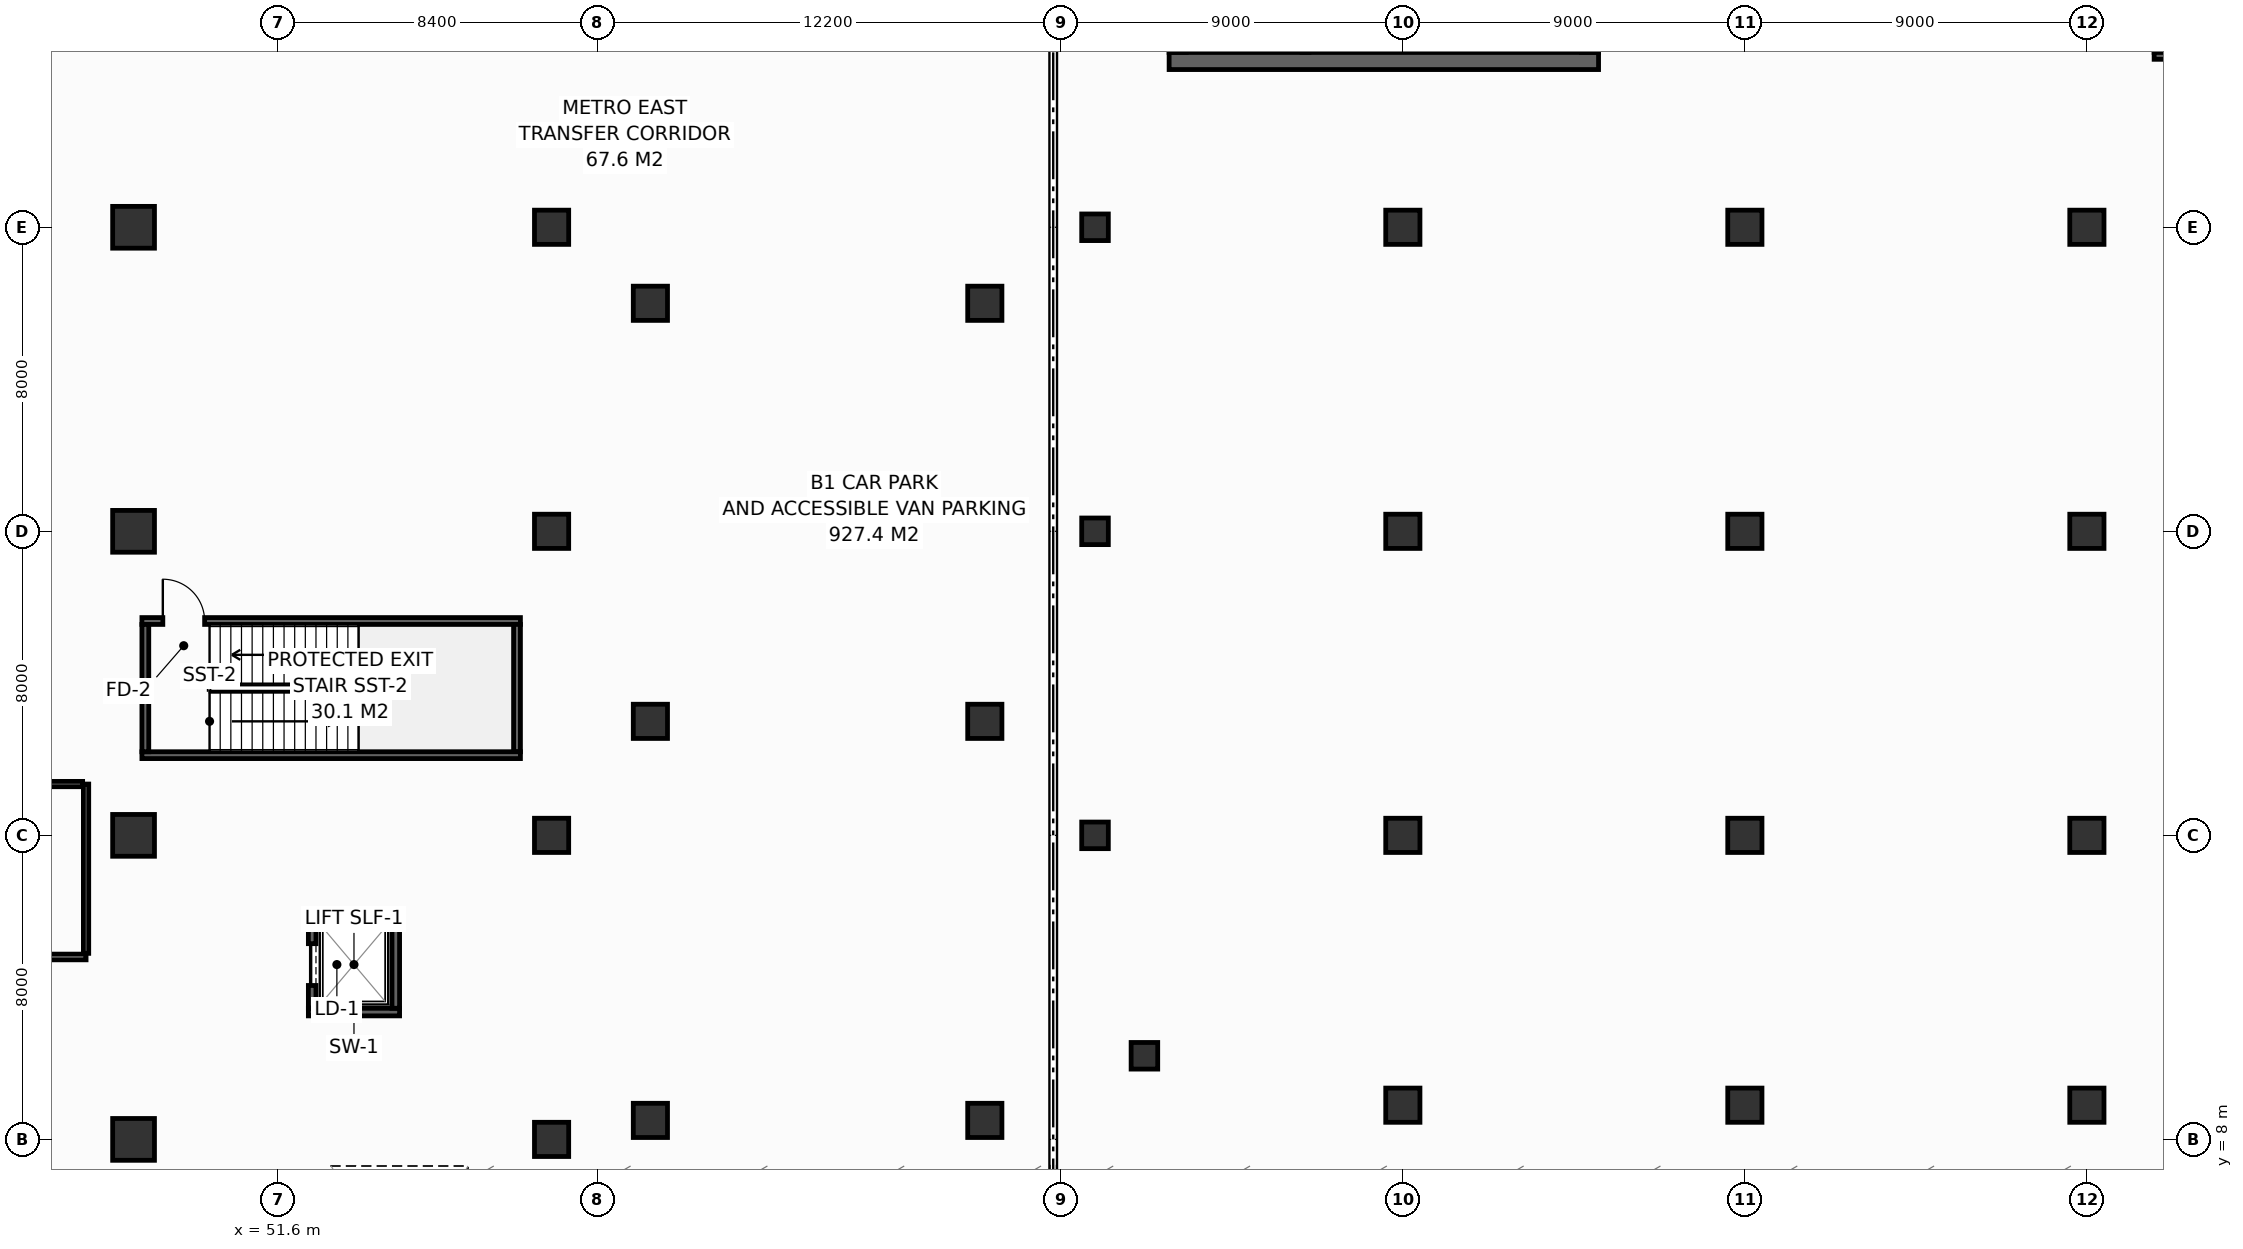
"""IFC4 building model, lengths in metres.
Left out: names, types, materials, properties, quantities, classifications, styles, units other than length and angle.
Written with IfcOpenShell. Run it as: python <this file> out.ifc"""

import sys

from ifc_helpers import new_model, si_unit, direction, frame, frame_2d, origin, origin_2d, place, context, subcontext, project, spatial, rectangle, extrude, element, fill, save


model = new_model("IFC4")
c1 = context("Model", 3, precision=1e-05, world=origin(), true_north=direction((0.0, 1.0)))
c2 = subcontext(c1, "Body", "Model", "MODEL_VIEW")
j1 = project(units=[si_unit("LENGTHUNIT", "METRE"), si_unit("PLANEANGLEUNIT", "RADIAN")], contexts=[c1])
p1 = place(None, origin())
s1 = spatial("IfcSite", under=j1, at=p1, CompositionType="ELEMENT")
p2 = place(p1, origin())
s2 = spatial("IfcBuilding", under=s1, at=p2, CompositionType="ELEMENT")
p3 = place(p2, frame((0.0, 0.0, -5.4)))
s3 = spatial("IfcBuildingStorey", under=s2, at=p3, CompositionType="ELEMENT", Elevation=-5.4)
p4 = place(p3, frame((75.05, 36.375, 0.0), z_axis=(0.0, 0.0, 1.0), x_axis=(1.0, 0.0, 0.0)))
e1 = element("IfcWall", 1, at=p4, inside=s3, PredefinedType="SHEAR", context=c2, shape_type="SweptSolid", body=[
    extrude(rectangle(XDim=11.3, YDim=0.45, at=frame_2d((5.65, 0.0))), origin(), (0.0, 0.0, 1.0), 5.05),
])
for number, where, z_axis, x_axis in (
    (2, (47.8, 8.0, 0.0), (0.0, 0.0, 1.0), (1.0, 0.0, 0.0)),
    (3, (47.8, 16.0, 0.0), (0.0, 0.0, 1.0), (1.0, 0.0, 0.0)),
    (4, (47.8, 24.0, 0.0), (0.0, 0.0, 1.0), (1.0, 0.0, 0.0)),
    (5, (47.8, 32.0, 0.0), (0.0, 0.0, 1.0), (1.0, 0.0, 0.0)),
):
    element("IfcColumn", number, at=place(p3, frame(where, z_axis=z_axis, x_axis=x_axis)), inside=s3, PredefinedType="COLUMN", context=c2, shape_type="SweptSolid", body=[
        extrude(rectangle(XDim=1.1, YDim=1.1, at=origin_2d()), origin(), (0.0, 0.0, 1.0), 5.4),
    ])
for number, where, z_axis, x_axis in (
    (6, (58.8, 8.0, 0.0), (0.0, 0.0, 1.0), (1.0, 0.0, 0.0)),
    (7, (58.8, 16.0, 0.0), (0.0, 0.0, 1.0), (1.0, 0.0, 0.0)),
    (8, (58.8, 24.0, 0.0), (0.0, 0.0, 1.0), (1.0, 0.0, 0.0)),
    (9, (58.8, 32.0, 0.0), (0.0, 0.0, 1.0), (1.0, 0.0, 0.0)),
    (10, (61.4, 8.5, 0.0), (0.0, 0.0, 1.0), (1.0, 0.0, 0.0)),
    (11, (70.2, 8.5, 0.0), (0.0, 0.0, 1.0), (1.0, 0.0, 0.0)),
    (12, (61.4, 19.0, 0.0), (0.0, 0.0, 1.0), (1.0, 0.0, 0.0)),
    (13, (70.2, 19.0, 0.0), (0.0, 0.0, 1.0), (1.0, 0.0, 0.0)),
    (14, (61.4, 30.0, 0.0), (0.0, 0.0, 1.0), (1.0, 0.0, 0.0)),
    (15, (70.2, 30.0, 0.0), (0.0, 0.0, 1.0), (1.0, 0.0, 0.0)),
):
    element("IfcColumn", number, at=place(p3, frame(where, z_axis=z_axis, x_axis=x_axis)), inside=s3, PredefinedType="COLUMN", context=c2, shape_type="SweptSolid", body=[
        extrude(rectangle(XDim=0.9, YDim=0.9, at=origin_2d()), origin(), (0.0, 0.0, 1.0), 5.4),
    ])
for number, where, z_axis, x_axis in (
    (16, (74.4, 10.2, 0.0), (0.0, 0.0, 1.0), (1.0, 0.0, 0.0)),
    (17, (73.1, 16.0, 0.0), (0.0, 0.0, 1.0), (1.0, 0.0, 0.0)),
    (18, (73.1, 24.0, 0.0), (0.0, 0.0, 1.0), (1.0, 0.0, 0.0)),
    (19, (73.1, 32.0, 0.0), (0.0, 0.0, 1.0), (1.0, 0.0, 0.0)),
):
    element("IfcColumn", number, at=place(p3, frame(where, z_axis=z_axis, x_axis=x_axis)), inside=s3, PredefinedType="COLUMN", context=c2, shape_type="SweptSolid", body=[
        extrude(rectangle(XDim=0.7, YDim=0.7, at=origin_2d()), origin(), (0.0, 0.0, 1.0), 5.4),
    ])
for number, where, z_axis, x_axis in (
    (20, (81.2, 8.9, 0.0), (0.0, 0.0, 1.0), (1.0, 0.0, 0.0)),
    (21, (81.2, 16.0, 0.0), (0.0, 0.0, 1.0), (1.0, 0.0, 0.0)),
    (22, (81.2, 24.0, 0.0), (0.0, 0.0, 1.0), (1.0, 0.0, 0.0)),
    (23, (81.2, 32.0, 0.0), (0.0, 0.0, 1.0), (1.0, 0.0, 0.0)),
    (24, (90.2, 8.9, 0.0), (0.0, 0.0, 1.0), (1.0, 0.0, 0.0)),
    (25, (90.2, 16.0, 0.0), (0.0, 0.0, 1.0), (1.0, 0.0, 0.0)),
    (26, (90.2, 24.0, 0.0), (0.0, 0.0, 1.0), (1.0, 0.0, 0.0)),
    (27, (90.2, 32.0, 0.0), (0.0, 0.0, 1.0), (1.0, 0.0, 0.0)),
    (28, (99.2, 8.9, 0.0), (0.0, 0.0, 1.0), (1.0, 0.0, 0.0)),
    (29, (99.2, 16.0, 0.0), (0.0, 0.0, 1.0), (1.0, 0.0, 0.0)),
    (30, (99.2, 24.0, 0.0), (0.0, 0.0, 1.0), (1.0, 0.0, 0.0)),
    (31, (99.2, 32.0, 0.0), (0.0, 0.0, 1.0), (1.0, 0.0, 0.0)),
):
    element("IfcColumn", number, at=place(p3, frame(where, z_axis=z_axis, x_axis=x_axis)), inside=s3, PredefinedType="COLUMN", context=c2, shape_type="SweptSolid", body=[
        extrude(rectangle(XDim=0.9, YDim=0.9, at=origin_2d()), origin(), (0.0, 0.0, 1.0), 5.4),
    ])
for number, where, z_axis, x_axis in (
    (32, (52.4, 11.35, 0.0), (0.0, 0.0, 1.0), (1.0, 0.0, 0.0)),
    (33, (52.4, 13.85, 0.0), (0.0, 0.0, 1.0), (1.0, 0.0, 0.0)),
):
    element("IfcWall", number, at=place(p3, frame(where, z_axis=z_axis, x_axis=x_axis)), inside=s3, PredefinedType="SHEAR", context=c2, shape_type="SweptSolid", body=[
        extrude(rectangle(XDim=2.4, YDim=0.2, at=frame_2d((1.2, 0.0))), origin(), (0.0, 0.0, 1.0), 5.05),
    ])
p5 = place(p3, frame((52.5, 11.45, 0.0), z_axis=(0.0, 0.0, 1.0), x_axis=(0.0, 1.0, 0.0)))
e34 = element("IfcWall", 34, at=p5, inside=s3, PredefinedType="SHEAR", context=c2, shape_type="SweptSolid", body=[
    extrude(rectangle(XDim=2.3, YDim=0.2, at=frame_2d((1.15, 0.0))), origin(), (0.0, 0.0, 1.0), 5.05),
])
p6 = place(p5, frame((0.6, 0.0, 0.0)))
e35 = element("IfcOpeningElement", 35, at=p6, cuts=e34, PredefinedType="OPENING", context=c2, shape_type="SweptSolid", body=[
    extrude(rectangle(XDim=1.1, YDim=2.2, at=frame_2d((0.55, 1.1))), frame((0.0, 0.11, 0.0), z_axis=(0.0, -1.0, 0.0), x_axis=(1.0, 0.0, 0.0)), (0.0, 0.0, 1.0), 0.22),
])
p7 = place(p3, frame((54.7, 11.45, 0.0), z_axis=(0.0, 0.0, 1.0), x_axis=(0.0, 1.0, 0.0)))
e36 = element("IfcWall", 36, at=p7, inside=s3, PredefinedType="SHEAR", context=c2, shape_type="SweptSolid", body=[
    extrude(rectangle(XDim=2.3, YDim=0.2, at=frame_2d((1.15, 0.0))), origin(), (0.0, 0.0, 1.0), 5.05),
])
p8 = place(p3, frame((100.97, 36.51, 0.0), z_axis=(0.0, 0.0, 1.0), x_axis=(1.0, 0.0, 0.0)))
e37 = element("IfcWall", 37, at=p8, inside=s3, PredefinedType="SHEAR", context=c2, shape_type="SweptSolid", body=[
    extrude(rectangle(XDim=3.41, YDim=0.18, at=frame_2d((1.705, 0.0))), origin(), (0.0, 0.0, 1.0), 5.05),
])
p9 = place(p3, frame((48.02, 21.64, 0.0), z_axis=(0.0, 0.0, 1.0), x_axis=(1.0, 0.0, 0.0)))
e38 = element("IfcWall", 38, at=p9, inside=s3, PredefinedType="SHEAR", context=c2, shape_type="SweptSolid", body=[
    extrude(rectangle(XDim=9.96, YDim=0.18, at=frame_2d((4.98, 0.0))), origin(), (0.0, 0.0, 1.0), 5.05),
])
p10 = place(p9, frame((0.55, 0.0, 0.0)))
e39 = element("IfcOpeningElement", 39, at=p10, cuts=e38, PredefinedType="OPENING", context=c2, shape_type="SweptSolid", body=[
    extrude(rectangle(XDim=1.1, YDim=2.15, at=frame_2d((0.55, 1.075))), frame((0.0, 0.1, 0.0), z_axis=(0.0, -1.0, 0.0), x_axis=(1.0, 0.0, 0.0)), (0.0, 0.0, 1.0), 0.2),
])
p11 = place(p3, frame((57.89, 21.55, 0.0), z_axis=(0.0, 0.0, 1.0), x_axis=(0.0, -1.0, 0.0)))
e40 = element("IfcWall", 40, at=p11, inside=s3, PredefinedType="SHEAR", context=c2, shape_type="SweptSolid", body=[
    extrude(rectangle(XDim=3.35, YDim=0.18, at=frame_2d((1.675, 0.0))), origin(), (0.0, 0.0, 1.0), 5.05),
])
p12 = place(p3, frame((57.98, 18.11, 0.0), z_axis=(0.0, 0.0, 1.0), x_axis=(-1.0, 0.0, 0.0)))
e41 = element("IfcWall", 41, at=p12, inside=s3, PredefinedType="SHEAR", context=c2, shape_type="SweptSolid", body=[
    extrude(rectangle(XDim=9.96, YDim=0.18, at=frame_2d((4.98, 0.0))), origin(), (0.0, 0.0, 1.0), 5.05),
])
p13 = place(p3, frame((48.11, 18.2, 0.0), z_axis=(0.0, 0.0, 1.0), x_axis=(0.0, 1.0, 0.0)))
e42 = element("IfcWall", 42, at=p13, inside=s3, PredefinedType="SHEAR", context=c2, shape_type="SweptSolid", body=[
    extrude(rectangle(XDim=3.35, YDim=0.18, at=frame_2d((1.675, 0.0))), origin(), (0.0, 0.0, 1.0), 5.05),
])
p14 = place(p3, frame((13.4, 12.8, 0.0), z_axis=(0.0, 0.0, 1.0), x_axis=(1.0, 0.0, 0.0)))
e43 = element("IfcWall", 43, at=p14, inside=s3, PredefinedType="PARTITIONING", context=c2, shape_type="SweptSolid", body=[
    extrude(rectangle(XDim=33.15, YDim=0.15, at=frame_2d((16.575, 0.0))), origin(), (0.0, 0.0, 1.0), 4.135),
])
p15 = place(p3, frame((46.55, 12.895, 0.0), z_axis=(0.0, 0.0, 1.0), x_axis=(0.0, 1.0, 0.0)))
e44 = element("IfcWall", 44, at=p15, inside=s3, PredefinedType="PARTITIONING", context=c2, shape_type="SweptSolid", body=[
    extrude(rectangle(XDim=4.455, YDim=0.14, at=frame_2d((2.228, 0.0))), origin(), (0.0, 0.0, 1.0), 4.135),
])
p16 = place(p3, frame((38.29, 17.35, 0.0), z_axis=(0.0, 0.0, 1.0), x_axis=(1.0, 0.0, 0.0)))
e45 = element("IfcWall", 45, at=p16, inside=s3, PredefinedType="PARTITIONING", context=c2, shape_type="SweptSolid", body=[
    extrude(rectangle(XDim=8.17, YDim=0.14, at=frame_2d((4.085, 0.0))), origin(), (0.0, 0.0, 1.0), 5.05),
])
p17 = place(p16, frame((3.635, 0.0, 0.0)))
e46 = element("IfcOpeningElement", 46, at=p17, cuts=e45, PredefinedType="OPENING", context=c2, shape_type="SweptSolid", body=[
    extrude(rectangle(XDim=0.9, YDim=2.1, at=frame_2d((0.45, 1.05))), frame((0.0, 0.08, 0.0), z_axis=(0.0, -1.0, 0.0), x_axis=(1.0, 0.0, 0.0)), (0.0, 0.0, 1.0), 0.16),
])
p18 = place(p6, origin())
e47 = element("IfcDoor", 47, at=p18, inside=s3, OperationType="SLIDING_TO_LEFT", PredefinedType="DOOR", context=c2, shape_type="SweptSolid", body=[
    extrude(rectangle(XDim=1.1, YDim=2.2, at=frame_2d((0.55, 1.1))), frame((0.0, 0.025, 0.0), z_axis=(0.0, -1.0, 0.0), x_axis=(1.0, 0.0, 0.0)), (0.0, 0.0, 1.0), 0.05),
])
fill(e35, e47)
p19 = place(p10, origin())
e48 = element("IfcDoor", 48, at=p19, inside=s3, OperationType="SINGLE_SWING_LEFT", PredefinedType="DOOR", context=c2, shape_type="SweptSolid", body=[
    extrude(rectangle(XDim=1.1, YDim=2.15, at=frame_2d((0.55, 1.075))), frame((0.0, 0.025, 0.0), z_axis=(0.0, -1.0, 0.0), x_axis=(1.0, 0.0, 0.0)), (0.0, 0.0, 1.0), 0.05),
])
fill(e39, e48)
save(model, sys.argv[1])
